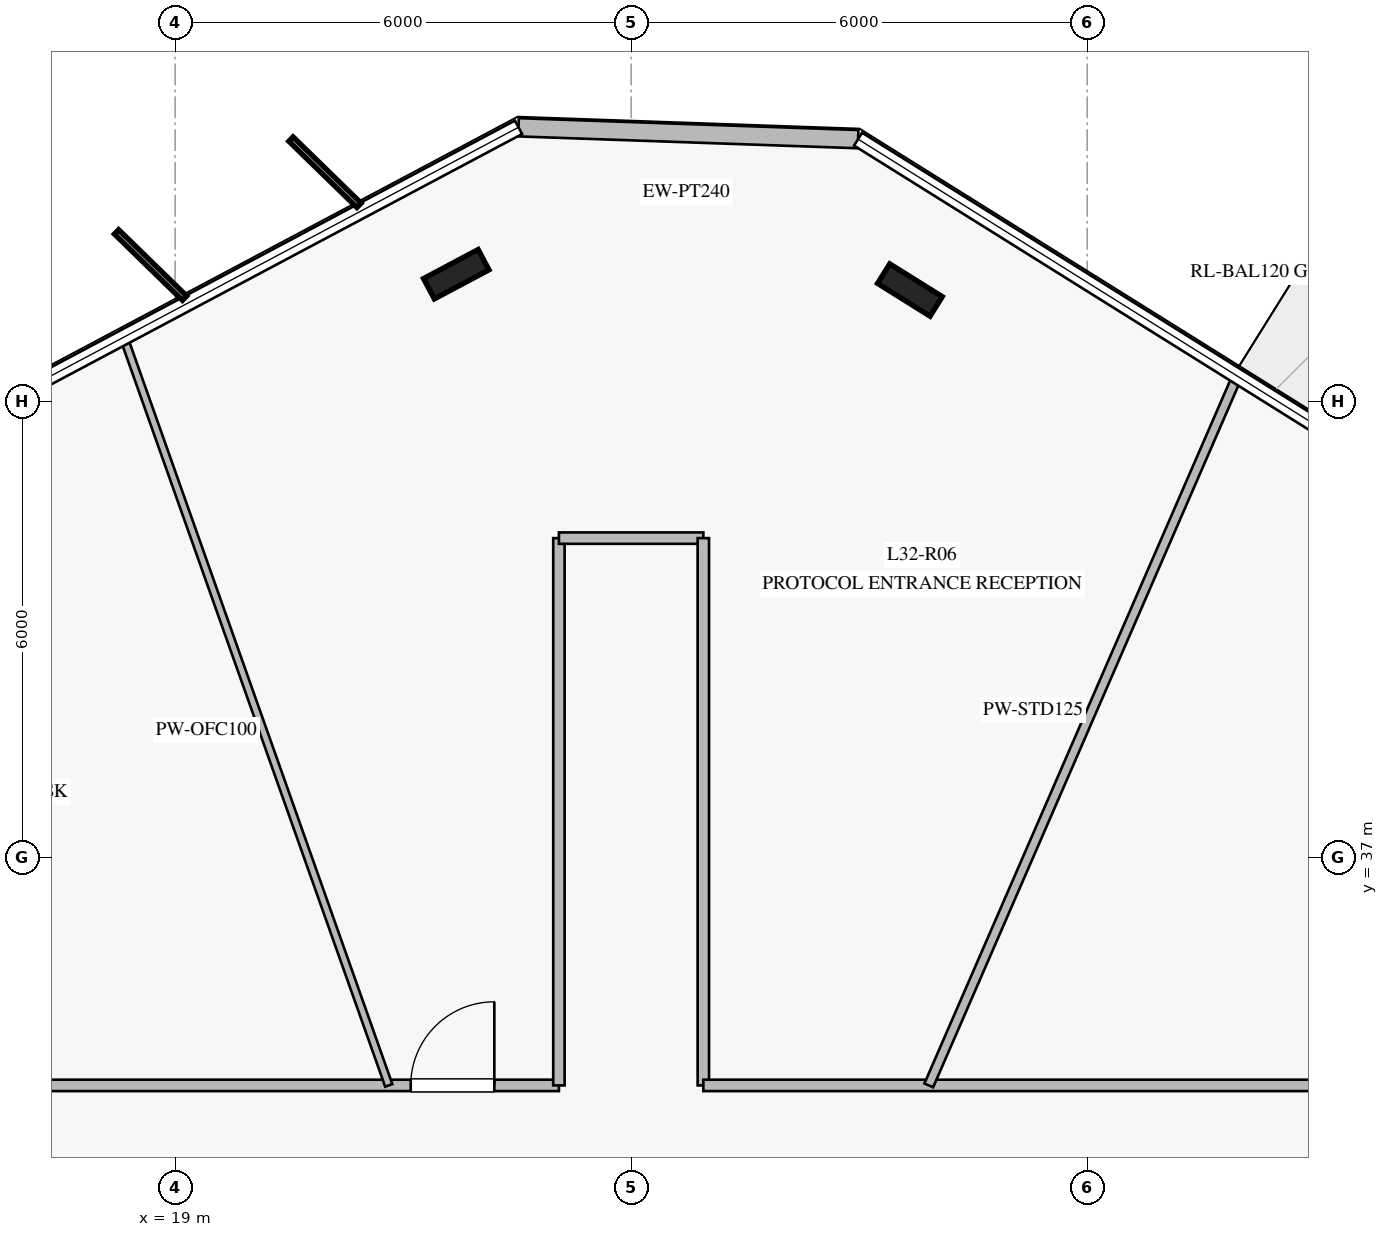
"""IFC4 building model, lengths in metres.
Left out: names, types, materials, properties, quantities, classifications, styles, units other than length and angle.
Written with IfcOpenShell. Run it as: python <this file> out.ifc"""

import sys

from ifc_helpers import new_model, si_unit, direction, frame, frame_2d, origin, origin_2d, place, context, subcontext, project, spatial, rectangle, i_section, extrude, element, fill, save


model = new_model("IFC4")
c1 = context("Model", 3, precision=1e-05, world=origin(), true_north=direction((0.0, 1.0)))
c2 = subcontext(c1, "Body", "Model", "MODEL_VIEW")
j1 = project(units=[si_unit("LENGTHUNIT", "METRE"), si_unit("PLANEANGLEUNIT", "RADIAN")], contexts=[c1])
p1 = place(None, origin())
s1 = spatial("IfcSite", under=j1, at=p1, CompositionType="ELEMENT")
p2 = place(p1, origin())
s2 = spatial("IfcBuilding", under=s1, at=p2, CompositionType="ELEMENT")
p3 = place(p2, frame((0.0, 0.0, 134.4)))
s3 = spatial("IfcBuildingStorey", under=s2, at=p3, CompositionType="ELEMENT", Elevation=134.4)
for number, where, z_axis, x_axis in (
    (1, (28.668, 44.464, 0.0), (0.0, 0.0, 1.0), (-0.848, 0.53, 0.0)),
    (2, (22.699, 44.672, 0.0), (0.0, 0.0, 1.0), (0.883, 0.469, 0.0)),
):
    element("IfcColumn", number, at=place(p3, frame(where, z_axis=z_axis, x_axis=x_axis)), inside=s3, PredefinedType="COLUMN", context=c2, shape_type="SweptSolid", body=[
        extrude(i_section(OverallWidth=0.303, OverallDepth=0.814, WebThickness=0.021, FlangeThickness=0.04, at=origin_2d()), origin(), (0.0, 0.0, 1.0), 4.0),
    ])
p4 = place(p3, frame((27.986, 46.449, 0.0), z_axis=(0.0, 0.0, 1.0), x_axis=(-0.999390988908, 0.034894860495, 0.0)))
e3 = element("IfcWall", 3, at=p4, inside=s3, PredefinedType="STANDARD", context=c2, shape_type="SweptSolid", body=[
    extrude(rectangle(XDim=4.471, YDim=0.24, at=frame_2d((2.235, 0.0))), origin(), (0.0, 0.0, 1.0), 3.76),
])
p5 = place(p3, frame((17.2, 34.0, 0.0), z_axis=(0.0, 0.0, 1.0), x_axis=(1.0, 0.0, 0.0)))
e4 = element("IfcWall", 4, at=p5, inside=s3, PredefinedType="PARTITIONING", context=c2, shape_type="SweptSolid", body=[
    extrude(rectangle(XDim=6.85, YDim=0.15, at=frame_2d((3.425, 0.0))), origin(), (0.0, 0.0, 1.0), 3.21),
])
p6 = place(p5, frame((4.9, 0.0, 0.0)))
e5 = element("IfcOpeningElement", 5, at=p6, cuts=e4, PredefinedType="OPENING", context=c2, shape_type="SweptSolid", body=[
    extrude(rectangle(XDim=1.1, YDim=2.2, at=frame_2d((0.55, 1.1))), frame((0.0, 0.085, 0.0), z_axis=(0.0, -1.0, 0.0), x_axis=(1.0, 0.0, 0.0)), (0.0, 0.0, 1.0), 0.17),
])
p7 = place(p3, frame((24.05, 34.0, 0.0), z_axis=(0.0, 0.0, 1.0), x_axis=(0.0, 1.0, 0.0)))
e6 = element("IfcWall", 6, at=p7, inside=s3, PredefinedType="PARTITIONING", context=c2, shape_type="SweptSolid", body=[
    extrude(rectangle(XDim=7.2, YDim=0.15, at=frame_2d((3.6, 0.0))), origin(), (0.0, 0.0, 1.0), 3.36),
])
p8 = place(p3, frame((24.05, 41.2, 0.0), z_axis=(0.0, 0.0, 1.0), x_axis=(1.0, 0.0, 0.0)))
e7 = element("IfcWall", 7, at=p8, inside=s3, PredefinedType="PARTITIONING", context=c2, shape_type="SweptSolid", body=[
    extrude(rectangle(XDim=1.9, YDim=0.15, at=frame_2d((0.95, 0.0))), origin(), (0.0, 0.0, 1.0), 3.76),
])
p9 = place(p3, frame((25.95, 41.2, 0.0), z_axis=(0.0, 0.0, 1.0), x_axis=(0.0, -1.0, 0.0)))
e8 = element("IfcWall", 8, at=p9, inside=s3, PredefinedType="PARTITIONING", context=c2, shape_type="SweptSolid", body=[
    extrude(rectangle(XDim=7.2, YDim=0.15, at=frame_2d((3.6, 0.0))), origin(), (0.0, 0.0, 1.0), 3.36),
])
p10 = place(p3, frame((25.95, 34.0, 0.0), z_axis=(0.0, 0.0, 1.0), x_axis=(1.0, 0.0, 0.0)))
e9 = element("IfcWall", 9, at=p10, inside=s3, PredefinedType="PARTITIONING", context=c2, shape_type="SweptSolid", body=[
    extrude(rectangle(XDim=15.25, YDim=0.15, at=frame_2d((7.625, 0.0))), origin(), (0.0, 0.0, 1.0), 3.21),
])
p11 = place(p10, frame((8.48, 0.0, 0.0)))
e10 = element("IfcOpeningElement", 10, at=p11, cuts=e9, PredefinedType="OPENING", context=c2, shape_type="SweptSolid", body=[
    extrude(rectangle(XDim=1.1, YDim=2.2, at=frame_2d((0.55, 1.1))), frame((0.0, 0.085, 0.0), z_axis=(0.0, -1.0, 0.0), x_axis=(1.0, 0.0, 0.0)), (0.0, 0.0, 1.0), 0.17),
])
p12 = place(p3, frame((28.916, 34.0, 0.0), z_axis=(0.0, 0.0, 1.0), x_axis=(0.398858798929, 0.917012354615, 0.0)))
e11 = element("IfcWall", 11, at=p12, inside=s3, PredefinedType="PARTITIONING", context=c2, shape_type="SweptSolid", body=[
    extrude(rectangle(XDim=10.159, YDim=0.125, at=frame_2d((5.08, 0.0))), origin(), (0.0, 0.0, 1.0), 3.16),
])
p13 = place(p3, frame((21.811, 34.0, 0.0), z_axis=(0.0, 0.0, 1.0), x_axis=(-0.333981087617, 0.942579775464, 0.0)))
e12 = element("IfcWall", 12, at=p13, inside=s3, PredefinedType="MOVABLE", context=c2, shape_type="SweptSolid", body=[
    extrude(rectangle(XDim=10.426, YDim=0.1, at=frame_2d((5.213, 0.0))), origin(), (0.0, 0.0, 1.0), 3.05),
])
p14 = place(p6, origin())
e13 = element("IfcDoor", 13, at=p14, inside=s3, OperationType="SINGLE_SWING_RIGHT", PredefinedType="DOOR", context=c2, shape_type="SweptSolid", body=[
    extrude(rectangle(XDim=1.1, YDim=2.2, at=frame_2d((0.55, 1.1))), frame((0.0, 0.025, 0.0), z_axis=(0.0, -1.0, 0.0), x_axis=(1.0, 0.0, 0.0)), (0.0, 0.0, 1.0), 0.05),
])
fill(e5, e13)
save(model, sys.argv[1])
